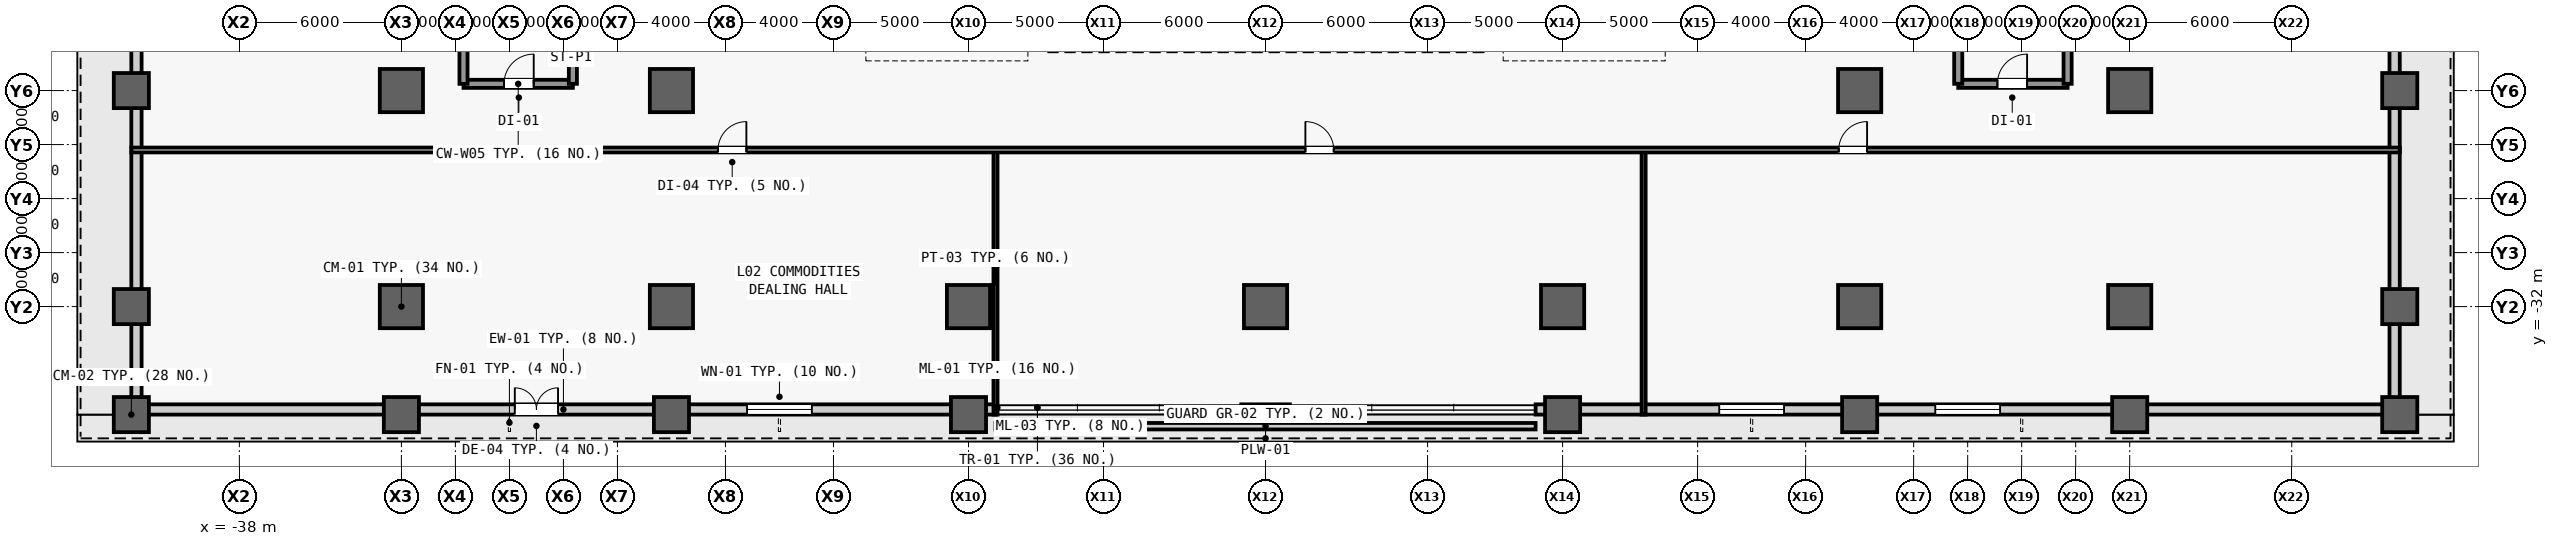
"""IFC4 building model, lengths in metres.
Left out: names, types, materials, properties, quantities, classifications, styles, units other than length and angle.
Written with IfcOpenShell. Run it as: python <this file> out.ifc"""

import sys

from ifc_helpers import new_model, si_unit, direction, frame, frame_2d, origin, origin_2d, place, context, subcontext, project, spatial, rectangle, extrude, source, transform, mapped, element, fill, save


model = new_model("IFC4")
c1 = context("Model", 3, precision=1e-05, world=origin(), true_north=direction((0.0, 1.0)))
c2 = subcontext(c1, "Body", "Model", "MODEL_VIEW")
j1 = project(units=[si_unit("LENGTHUNIT", "METRE"), si_unit("PLANEANGLEUNIT", "RADIAN")], contexts=[c1])
p1 = place(None, origin())
s1 = spatial("IfcSite", under=j1, at=p1, CompositionType="ELEMENT")
p2 = place(p1, origin())
s2 = spatial("IfcBuilding", under=s1, at=p2, CompositionType="ELEMENT")
p3 = place(p2, frame((0.0, 0.0, 12.0)))
s3 = spatial("IfcBuildingStorey", under=s2, at=p3, CompositionType="ELEMENT", Elevation=12.0)
m1 = source(origin(), c2, "Body", "SweptSolid", [
    extrude(rectangle(XDim=1.3, YDim=1.3, at=origin_2d()), origin(), (0.0, 0.0, 1.0), 5.4),
])
for number, where, z_axis, x_axis in (
    (1, (-42.0, -36.0, 0.0), (0.0, 0.0, 1.0), (1.0, 0.0, 0.0)),
    (2, (-42.0, -24.0, 0.0), (0.0, 0.0, 1.0), (1.0, 0.0, 0.0)),
    (3, (-32.0, -36.0, 0.0), (0.0, 0.0, 1.0), (1.0, 0.0, 0.0)),
):
    element("IfcColumn", number, at=place(p3, frame(where, z_axis=z_axis, x_axis=x_axis)), inside=s3, PredefinedType="COLUMN", context=c2, shape_type="MappedRepresentation", body=[
        mapped(m1, transform((0.0, 0.0, 0.0), scale=1.0)),
    ])
m2 = source(origin(), c2, "Body", "SweptSolid", [
    extrude(rectangle(XDim=1.6, YDim=1.6, at=origin_2d()), origin(), (0.0, 0.0, 1.0), 5.4),
])
for number, where, z_axis, x_axis in (
    (4, (-32.0, -32.0, 0.0), (0.0, 0.0, 1.0), (1.0, 0.0, 0.0)),
    (5, (-32.0, -24.0, 0.0), (0.0, 0.0, 1.0), (1.0, 0.0, 0.0)),
):
    element("IfcColumn", number, at=place(p3, frame(where, z_axis=z_axis, x_axis=x_axis)), inside=s3, PredefinedType="COLUMN", context=c2, shape_type="MappedRepresentation", body=[
        mapped(m2, transform((0.0, 0.0, 0.0), scale=1.0)),
    ])
p4 = place(p3, frame((-22.0, -36.0, 0.0), z_axis=(0.0, 0.0, 1.0), x_axis=(1.0, 0.0, 0.0)))
e6 = element("IfcColumn", 6, at=p4, inside=s3, PredefinedType="COLUMN", context=c2, shape_type="MappedRepresentation", body=[
    mapped(m1, transform((0.0, 0.0, 0.0), scale=1.0)),
])
for number, where, z_axis, x_axis in (
    (7, (-22.0, -32.0, 0.0), (0.0, 0.0, 1.0), (1.0, 0.0, 0.0)),
    (8, (-22.0, -24.0, 0.0), (0.0, 0.0, 1.0), (1.0, 0.0, 0.0)),
):
    element("IfcColumn", number, at=place(p3, frame(where, z_axis=z_axis, x_axis=x_axis)), inside=s3, PredefinedType="COLUMN", context=c2, shape_type="MappedRepresentation", body=[
        mapped(m2, transform((0.0, 0.0, 0.0), scale=1.0)),
    ])
p5 = place(p3, frame((-11.0, -36.0, 0.0), z_axis=(0.0, 0.0, 1.0), x_axis=(1.0, 0.0, 0.0)))
e9 = element("IfcColumn", 9, at=p5, inside=s3, PredefinedType="COLUMN", context=c2, shape_type="MappedRepresentation", body=[
    mapped(m1, transform((0.0, 0.0, 0.0), scale=1.0)),
])
for number, where, z_axis, x_axis in (
    (10, (-11.0, -32.0, 0.0), (0.0, 0.0, 1.0), (1.0, 0.0, 0.0)),
    (11, (0.0, -32.0, 0.0), (0.0, 0.0, 1.0), (1.0, 0.0, 0.0)),
):
    element("IfcColumn", number, at=place(p3, frame(where, z_axis=z_axis, x_axis=x_axis)), inside=s3, PredefinedType="COLUMN", context=c2, shape_type="MappedRepresentation", body=[
        mapped(m2, transform((0.0, 0.0, 0.0), scale=1.0)),
    ])
p6 = place(p3, frame((11.0, -36.0, 0.0), z_axis=(0.0, 0.0, 1.0), x_axis=(1.0, 0.0, 0.0)))
e12 = element("IfcColumn", 12, at=p6, inside=s3, PredefinedType="COLUMN", context=c2, shape_type="MappedRepresentation", body=[
    mapped(m1, transform((0.0, 0.0, 0.0), scale=1.0)),
])
p7 = place(p3, frame((11.0, -32.0, 0.0), z_axis=(0.0, 0.0, 1.0), x_axis=(1.0, 0.0, 0.0)))
e13 = element("IfcColumn", 13, at=p7, inside=s3, PredefinedType="COLUMN", context=c2, shape_type="MappedRepresentation", body=[
    mapped(m2, transform((0.0, 0.0, 0.0), scale=1.0)),
])
p8 = place(p3, frame((22.0, -36.0, 0.0), z_axis=(0.0, 0.0, 1.0), x_axis=(1.0, 0.0, 0.0)))
e14 = element("IfcColumn", 14, at=p8, inside=s3, PredefinedType="COLUMN", context=c2, shape_type="MappedRepresentation", body=[
    mapped(m1, transform((0.0, 0.0, 0.0), scale=1.0)),
])
for number, where, z_axis, x_axis in (
    (15, (22.0, -32.0, 0.0), (0.0, 0.0, 1.0), (1.0, 0.0, 0.0)),
    (16, (22.0, -24.0, 0.0), (0.0, 0.0, 1.0), (1.0, 0.0, 0.0)),
):
    element("IfcColumn", number, at=place(p3, frame(where, z_axis=z_axis, x_axis=x_axis)), inside=s3, PredefinedType="COLUMN", context=c2, shape_type="MappedRepresentation", body=[
        mapped(m2, transform((0.0, 0.0, 0.0), scale=1.0)),
    ])
p9 = place(p3, frame((32.0, -36.0, 0.0), z_axis=(0.0, 0.0, 1.0), x_axis=(1.0, 0.0, 0.0)))
e17 = element("IfcColumn", 17, at=p9, inside=s3, PredefinedType="COLUMN", context=c2, shape_type="MappedRepresentation", body=[
    mapped(m1, transform((0.0, 0.0, 0.0), scale=1.0)),
])
for number, where, z_axis, x_axis in (
    (18, (32.0, -32.0, 0.0), (0.0, 0.0, 1.0), (1.0, 0.0, 0.0)),
    (19, (32.0, -24.0, 0.0), (0.0, 0.0, 1.0), (1.0, 0.0, 0.0)),
):
    element("IfcColumn", number, at=place(p3, frame(where, z_axis=z_axis, x_axis=x_axis)), inside=s3, PredefinedType="COLUMN", context=c2, shape_type="MappedRepresentation", body=[
        mapped(m2, transform((0.0, 0.0, 0.0), scale=1.0)),
    ])
for number, where, z_axis, x_axis in (
    (20, (42.0, -36.0, 0.0), (0.0, 0.0, 1.0), (1.0, 0.0, 0.0)),
    (21, (42.0, -24.0, 0.0), (0.0, 0.0, 1.0), (1.0, 0.0, 0.0)),
    (22, (-42.0, -32.0, 0.0), (0.0, 0.0, 1.0), (1.0, 0.0, 0.0)),
    (23, (42.0, -32.0, 0.0), (0.0, 0.0, 1.0), (1.0, 0.0, 0.0)),
):
    element("IfcColumn", number, at=place(p3, frame(where, z_axis=z_axis, x_axis=x_axis)), inside=s3, PredefinedType="COLUMN", context=c2, shape_type="MappedRepresentation", body=[
        mapped(m1, transform((0.0, 0.0, 0.0), scale=1.0)),
    ])
m3 = source(origin(), c2, "Body", "SweptSolid", [
    extrude(rectangle(XDim=32.0, YDim=0.38, at=frame_2d((16.0, 0.0))), origin(), (0.0, 0.0, 1.0), 3.28),
])
p10 = place(p3, frame((-42.0, -35.81, 0.0), z_axis=(0.0, 0.0, 1.0), x_axis=(1.0, 0.0, 0.0)))
e24 = element("IfcWall", 24, at=p10, inside=s3, PredefinedType="STANDARD", context=c2, shape_type="MappedRepresentation", body=[
    mapped(m3, transform((0.0, 0.0, 0.0), scale=1.0)),
])
m4 = source(origin(), c2, "Body", "SweptSolid", [
    extrude(rectangle(XDim=1.6, YDim=2.25, at=frame_2d((0.8, 1.125))), frame((0.0, 0.2, 0.0), z_axis=(0.0, -1.0, 0.0), x_axis=(1.0, 0.0, 0.0)), (0.0, 0.0, 1.0), 0.4),
])
p11 = place(p10, frame((14.2, 0.0, 0.0)))
e25 = element("IfcOpeningElement", 25, at=p11, cuts=e24, PredefinedType="OPENING", context=c2, shape_type="MappedRepresentation", body=[
    mapped(m4, transform((0.0, 0.0, 0.0), scale=1.0)),
])
m5 = source(origin(), c2, "Body", "SweptSolid", [
    extrude(rectangle(XDim=2.4, YDim=2.56, at=frame_2d((1.2, 1.28))), frame((0.0, 0.2, 0.0), z_axis=(0.0, -1.0, 0.0), x_axis=(1.0, 0.0, 0.0)), (0.0, 0.0, 1.0), 0.4),
])
p12 = place(p10, frame((22.8, 0.0, 0.5)))
e26 = element("IfcOpeningElement", 26, at=p12, cuts=e24, PredefinedType="OPENING", context=c2, shape_type="MappedRepresentation", body=[
    mapped(m5, transform((0.0, 0.0, 0.0), scale=1.0)),
])
m6 = source(origin(), c2, "Body", "SweptSolid", [
    extrude(rectangle(XDim=1.8, YDim=0.38, at=frame_2d((0.9, 0.0))), origin(), (0.0, 0.0, 1.0), 3.28),
])
p13 = place(p3, frame((-0.9, -35.81, 0.0), z_axis=(0.0, 0.0, 1.0), x_axis=(1.0, 0.0, 0.0)))
e27 = element("IfcWall", 27, at=p13, inside=s3, PredefinedType="STANDARD", context=c2, shape_type="MappedRepresentation", body=[
    mapped(m6, transform((0.0, 0.0, 0.0), scale=1.0)),
])
p14 = place(p3, frame((10.0, -35.81, 0.0), z_axis=(0.0, 0.0, 1.0), x_axis=(1.0, 0.0, 0.0)))
e28 = element("IfcWall", 28, at=p14, inside=s3, PredefinedType="STANDARD", context=c2, shape_type="MappedRepresentation", body=[
    mapped(m3, transform((0.0, 0.0, 0.0), scale=1.0)),
])
p15 = place(p14, frame((6.8, 0.0, 0.5)))
e29 = element("IfcOpeningElement", 29, at=p15, cuts=e28, PredefinedType="OPENING", context=c2, shape_type="MappedRepresentation", body=[
    mapped(m5, transform((0.0, 0.0, 0.0), scale=1.0)),
])
p16 = place(p14, frame((14.8, 0.0, 0.5)))
e30 = element("IfcOpeningElement", 30, at=p16, cuts=e28, PredefinedType="OPENING", context=c2, shape_type="MappedRepresentation", body=[
    mapped(m5, transform((0.0, 0.0, 0.0), scale=1.0)),
])
m7 = source(origin(), c2, "Body", "SweptSolid", [
    extrude(rectangle(XDim=71.24, YDim=0.38, at=frame_2d((35.62, 0.0))), origin(), (0.0, 0.0, 1.0), 3.28),
])
p17 = place(p3, frame((-41.81, -35.62, 0.0), z_axis=(0.0, 0.0, 1.0), x_axis=(0.0, 1.0, 0.0)))
e31 = element("IfcWall", 31, at=p17, inside=s3, PredefinedType="STANDARD", context=c2, shape_type="MappedRepresentation", body=[
    mapped(m7, transform((0.0, 0.0, 0.0), scale=1.0)),
])
p18 = place(p17, frame((40.82, 0.0, 0.0)))
e32 = element("IfcOpeningElement", 32, at=p18, cuts=e31, PredefinedType="OPENING", context=c2, shape_type="MappedRepresentation", body=[
    mapped(m4, transform((0.0, 0.0, 0.0), scale=1.0)),
])
p19 = place(p17, frame((16.61, 0.0, 0.5)))
e33 = element("IfcOpeningElement", 33, at=p19, cuts=e31, PredefinedType="OPENING", context=c2, shape_type="MappedRepresentation", body=[
    mapped(m5, transform((0.0, 0.0, 0.0), scale=1.0)),
])
p20 = place(p17, frame((52.23, 0.0, 0.5)))
e34 = element("IfcOpeningElement", 34, at=p20, cuts=e31, PredefinedType="OPENING", context=c2, shape_type="MappedRepresentation", body=[
    mapped(m5, transform((0.0, 0.0, 0.0), scale=1.0)),
])
p21 = place(p3, frame((41.81, -35.62, 0.0), z_axis=(0.0, 0.0, 1.0), x_axis=(0.0, 1.0, 0.0)))
e35 = element("IfcWall", 35, at=p21, inside=s3, PredefinedType="STANDARD", context=c2, shape_type="MappedRepresentation", body=[
    mapped(m7, transform((0.0, 0.0, 0.0), scale=1.0)),
])
p22 = place(p21, frame((40.82, 0.0, 0.0)))
e36 = element("IfcOpeningElement", 36, at=p22, cuts=e35, PredefinedType="OPENING", context=c2, shape_type="MappedRepresentation", body=[
    mapped(m4, transform((0.0, 0.0, 0.0), scale=1.0)),
])
p23 = place(p21, frame((16.61, 0.0, 0.5)))
e37 = element("IfcOpeningElement", 37, at=p23, cuts=e35, PredefinedType="OPENING", context=c2, shape_type="MappedRepresentation", body=[
    mapped(m5, transform((0.0, 0.0, 0.0), scale=1.0)),
])
p24 = place(p21, frame((34.42, 0.0, 0.5)))
e38 = element("IfcOpeningElement", 38, at=p24, cuts=e35, PredefinedType="OPENING", context=c2, shape_type="MappedRepresentation", body=[
    mapped(m5, transform((0.0, 0.0, 0.0), scale=1.0)),
])
p25 = place(p21, frame((52.23, 0.0, 0.5)))
e39 = element("IfcOpeningElement", 39, at=p25, cuts=e35, PredefinedType="OPENING", context=c2, shape_type="MappedRepresentation", body=[
    mapped(m5, transform((0.0, 0.0, 0.0), scale=1.0)),
])
m8 = source(origin(), c2, "Body", "SweptSolid", [
    extrude(rectangle(XDim=20.0, YDim=0.24, at=frame_2d((10.0, 0.0))), origin(), (0.0, 0.0, 1.0), 0.65),
])
p26 = place(p3, frame((-10.0, -36.43, 0.0), z_axis=(0.0, 0.0, 1.0), x_axis=(1.0, 0.0, 0.0)))
e40 = element("IfcWall", 40, at=p26, inside=s3, PredefinedType="STANDARD", context=c2, shape_type="MappedRepresentation", body=[
    mapped(m8, transform((0.0, 0.0, 0.0), scale=1.0)),
])
m9 = source(origin(), c2, "Body", "SweptSolid", [
    extrude(rectangle(XDim=4.05, YDim=0.3, at=frame_2d((2.025, 0.0))), origin(), (0.0, 0.0, 1.0), 5.08),
])
p27 = place(p3, frame((-29.7, -23.75, 0.0), z_axis=(0.0, 0.0, 1.0), x_axis=(1.0, 0.0, 0.0)))
e41 = element("IfcWall", 41, at=p27, inside=s3, PredefinedType="SHEAR", context=c2, shape_type="MappedRepresentation", body=[
    mapped(m9, transform((0.0, 0.0, 0.0), scale=1.0)),
])
m10 = source(origin(), c2, "Body", "SweptSolid", [
    extrude(rectangle(XDim=1.1, YDim=2.2, at=frame_2d((0.55, 1.1))), frame((0.0, 0.16, 0.0), z_axis=(0.0, -1.0, 0.0), x_axis=(1.0, 0.0, 0.0)), (0.0, 0.0, 1.0), 0.32),
])
p28 = place(p27, frame((1.5, 0.0, 0.0)))
e42 = element("IfcOpeningElement", 42, at=p28, cuts=e41, PredefinedType="OPENING", context=c2, shape_type="MappedRepresentation", body=[
    mapped(m10, transform((0.0, 0.0, 0.0), scale=1.0)),
])
m11 = source(origin(), c2, "Body", "SweptSolid", [
    extrude(rectangle(XDim=10.5, YDim=0.3, at=frame_2d((5.25, 0.0))), origin(), (0.0, 0.0, 1.0), 5.08),
])
for number, where, z_axis, x_axis in (
    (43, (-29.7, -23.75, 0.0), (0.0, 0.0, 1.0), (0.0, 1.0, 0.0)),
    (44, (-25.65, -23.75, 0.0), (0.0, 0.0, 1.0), (0.0, 1.0, 0.0)),
):
    element("IfcWall", number, at=place(p3, frame(where, z_axis=z_axis, x_axis=x_axis)), inside=s3, PredefinedType="SHEAR", context=c2, shape_type="MappedRepresentation", body=[
        mapped(m11, transform((0.0, 0.0, 0.0), scale=1.0)),
    ])
p29 = place(p3, frame((25.65, -23.75, 0.0), z_axis=(0.0, 0.0, 1.0), x_axis=(1.0, 0.0, 0.0)))
e45 = element("IfcWall", 45, at=p29, inside=s3, PredefinedType="SHEAR", context=c2, shape_type="MappedRepresentation", body=[
    mapped(m9, transform((0.0, 0.0, 0.0), scale=1.0)),
])
p30 = place(p29, frame((1.45, 0.0, 0.0)))
e46 = element("IfcOpeningElement", 46, at=p30, cuts=e45, PredefinedType="OPENING", context=c2, shape_type="MappedRepresentation", body=[
    mapped(m10, transform((0.0, 0.0, 0.0), scale=1.0)),
])
for number, where, z_axis, x_axis in (
    (47, (25.65, -23.75, 0.0), (0.0, 0.0, 1.0), (0.0, 1.0, 0.0)),
    (48, (29.7, -23.75, 0.0), (0.0, 0.0, 1.0), (0.0, 1.0, 0.0)),
):
    element("IfcWall", number, at=place(p3, frame(where, z_axis=z_axis, x_axis=x_axis)), inside=s3, PredefinedType="SHEAR", context=c2, shape_type="MappedRepresentation", body=[
        mapped(m11, transform((0.0, 0.0, 0.0), scale=1.0)),
    ])
m12 = source(origin(), c2, "Body", "SweptSolid", [
    extrude(rectangle(XDim=9.8, YDim=0.15, at=frame_2d((4.9, 0.0))), origin(), (0.0, 0.0, 1.0), 5.08),
])
for number, where, z_axis, x_axis in (
    (49, (-10.0, -36.0, 0.0), (0.0, 0.0, 1.0), (0.0, 1.0, 0.0)),
    (50, (14.0, -36.0, 0.0), (0.0, 0.0, 1.0), (0.0, 1.0, 0.0)),
):
    element("IfcWall", number, at=place(p3, frame(where, z_axis=z_axis, x_axis=x_axis)), inside=s3, PredefinedType="PARTITIONING", context=c2, shape_type="MappedRepresentation", body=[
        mapped(m12, transform((0.0, 0.0, 0.0), scale=1.0)),
    ])
m13 = source(origin(), c2, "Body", "SweptSolid", [
    extrude(rectangle(XDim=84.0, YDim=0.18, at=frame_2d((42.0, 0.0))), origin(), (0.0, 0.0, 1.0), 5.08),
])
p31 = place(p3, frame((-42.0, -26.2, 0.0), z_axis=(0.0, 0.0, 1.0), x_axis=(1.0, 0.0, 0.0)))
e51 = element("IfcWall", 51, at=p31, inside=s3, PredefinedType="PARTITIONING", context=c2, shape_type="MappedRepresentation", body=[
    mapped(m13, transform((0.0, 0.0, 0.0), scale=1.0)),
])
m14 = source(origin(), c2, "Body", "SweptSolid", [
    extrude(rectangle(XDim=1.05, YDim=2.2, at=frame_2d((0.525, 1.1))), frame((0.0, 0.1, 0.0), z_axis=(0.0, -1.0, 0.0), x_axis=(1.0, 0.0, 0.0)), (0.0, 0.0, 1.0), 0.2),
])
p32 = place(p31, frame((21.725, 0.0, 0.0)))
e52 = element("IfcOpeningElement", 52, at=p32, cuts=e51, PredefinedType="OPENING", context=c2, shape_type="MappedRepresentation", body=[
    mapped(m14, transform((0.0, 0.0, 0.0), scale=1.0)),
])
p33 = place(p31, frame((43.475, 0.0, 0.0)))
e53 = element("IfcOpeningElement", 53, at=p33, cuts=e51, PredefinedType="OPENING", context=c2, shape_type="MappedRepresentation", body=[
    mapped(m14, transform((0.0, 0.0, 0.0), scale=1.0)),
])
p34 = place(p31, frame((63.225, 0.0, 0.0)))
e54 = element("IfcOpeningElement", 54, at=p34, cuts=e51, PredefinedType="OPENING", context=c2, shape_type="MappedRepresentation", body=[
    mapped(m14, transform((0.0, 0.0, 0.0), scale=1.0)),
])
m15 = source(origin(), c2, "Body", "SweptSolid", [
    extrude(rectangle(XDim=1.6, YDim=2.25, at=frame_2d((0.8, 1.125))), frame((0.0, 0.025, 0.0), z_axis=(0.0, -1.0, 0.0), x_axis=(1.0, 0.0, 0.0)), (0.0, 0.0, 1.0), 0.05),
])
p35 = place(p11, origin())
e55 = element("IfcDoor", 55, at=p35, inside=s3, OperationType="DOUBLE_DOOR_SINGLE_SWING", PredefinedType="DOOR", context=c2, shape_type="MappedRepresentation", body=[
    mapped(m15, transform((0.0, 0.0, 0.0), scale=1.0)),
])
fill(e25, e55)
m16 = source(origin(), c2, "Body", "SweptSolid", [
    extrude(rectangle(XDim=2.4, YDim=2.56, at=frame_2d((1.2, 1.28))), frame((0.0, 0.03, 0.0), z_axis=(0.0, -1.0, 0.0), x_axis=(1.0, 0.0, 0.0)), (0.0, 0.0, 1.0), 0.06),
])
p36 = place(p12, origin())
e56 = element("IfcWindow", 56, at=p36, inside=s3, PartitioningType="SINGLE_PANEL", PredefinedType="WINDOW", context=c2, shape_type="MappedRepresentation", body=[
    mapped(m16, transform((0.0, 0.0, 0.0), scale=1.0)),
])
fill(e26, e56)
p37 = place(p15, origin())
e57 = element("IfcWindow", 57, at=p37, inside=s3, PartitioningType="SINGLE_PANEL", PredefinedType="WINDOW", context=c2, shape_type="MappedRepresentation", body=[
    mapped(m16, transform((0.0, 0.0, 0.0), scale=1.0)),
])
fill(e29, e57)
p38 = place(p16, origin())
e58 = element("IfcWindow", 58, at=p38, inside=s3, PartitioningType="SINGLE_PANEL", PredefinedType="WINDOW", context=c2, shape_type="MappedRepresentation", body=[
    mapped(m16, transform((0.0, 0.0, 0.0), scale=1.0)),
])
fill(e30, e58)
m17 = source(origin(), c2, "Body", "SweptSolid", [
    extrude(rectangle(XDim=1.1, YDim=2.2, at=frame_2d((0.55, 1.1))), frame((0.0, 0.025, 0.0), z_axis=(0.0, -1.0, 0.0), x_axis=(1.0, 0.0, 0.0)), (0.0, 0.0, 1.0), 0.05),
])
p39 = place(p28, origin())
e59 = element("IfcDoor", 59, at=p39, inside=s3, OperationType="SINGLE_SWING_RIGHT", PredefinedType="DOOR", context=c2, shape_type="MappedRepresentation", body=[
    mapped(m17, transform((0.0, 0.0, 0.0), scale=1.0)),
])
fill(e42, e59)
p40 = place(p30, origin())
e60 = element("IfcDoor", 60, at=p40, inside=s3, OperationType="SINGLE_SWING_RIGHT", PredefinedType="DOOR", context=c2, shape_type="MappedRepresentation", body=[
    mapped(m17, transform((0.0, 0.0, 0.0), scale=1.0)),
])
fill(e46, e60)
m18 = source(origin(), c2, "Body", "SweptSolid", [
    extrude(rectangle(XDim=1.05, YDim=2.2, at=frame_2d((0.525, 1.1))), frame((0.0, 0.025, 0.0), z_axis=(0.0, -1.0, 0.0), x_axis=(1.0, 0.0, 0.0)), (0.0, 0.0, 1.0), 0.05),
])
p41 = place(p32, origin())
e61 = element("IfcDoor", 61, at=p41, inside=s3, OperationType="SINGLE_SWING_RIGHT", PredefinedType="DOOR", context=c2, shape_type="MappedRepresentation", body=[
    mapped(m18, transform((0.0, 0.0, 0.0), scale=1.0)),
])
fill(e52, e61)
p42 = place(p33, origin())
e62 = element("IfcDoor", 62, at=p42, inside=s3, OperationType="SINGLE_SWING_LEFT", PredefinedType="DOOR", context=c2, shape_type="MappedRepresentation", body=[
    mapped(m18, transform((0.0, 0.0, 0.0), scale=1.0)),
])
fill(e53, e62)
p43 = place(p34, origin())
e63 = element("IfcDoor", 63, at=p43, inside=s3, OperationType="SINGLE_SWING_RIGHT", PredefinedType="DOOR", context=c2, shape_type="MappedRepresentation", body=[
    mapped(m18, transform((0.0, 0.0, 0.0), scale=1.0)),
])
fill(e54, e63)
save(model, sys.argv[1])
